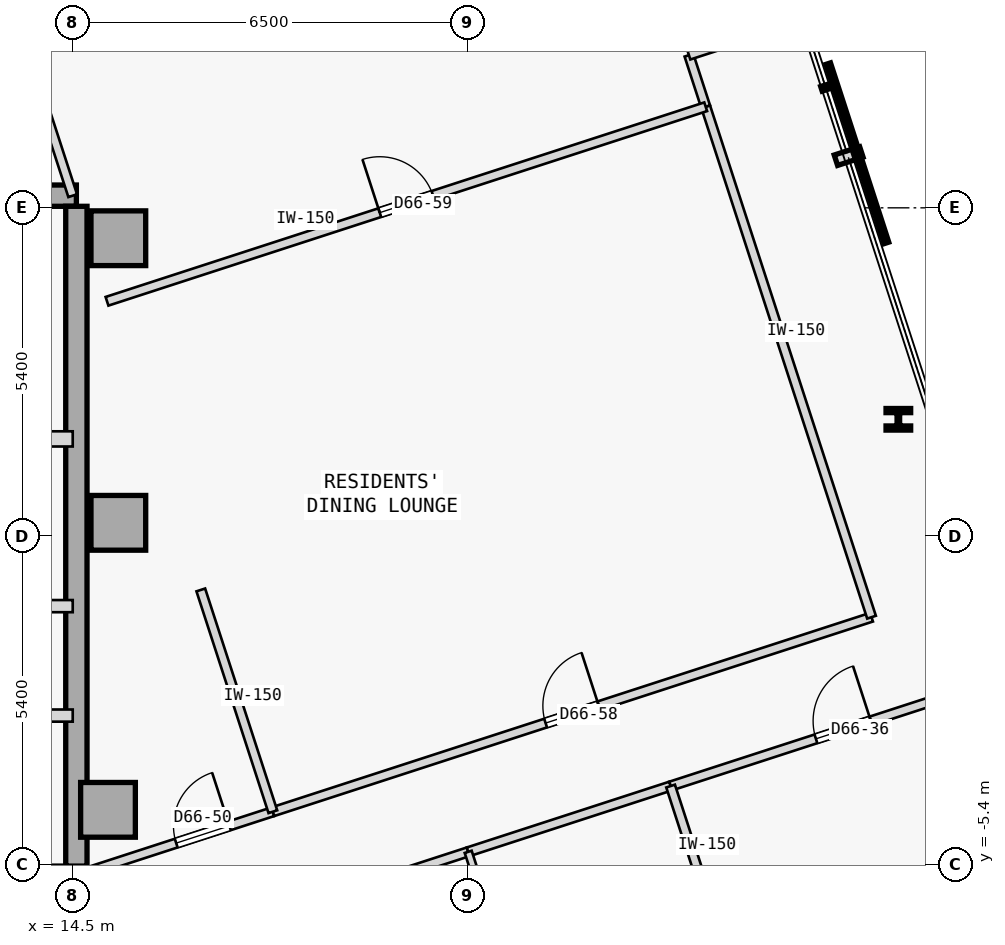
"""IFC4 building model, lengths in metres.
Left out: names, types, materials, properties, quantities, classifications, styles, units other than length and angle.
Written with IfcOpenShell. Run it as: python <this file> out.ifc"""

import sys

from ifc_helpers import new_model, si_unit, direction, frame, frame_2d, origin, origin_2d, place, context, subcontext, project, spatial, rectangle, i_section, extrude, element, fill, save


model = new_model("IFC4")
c1 = context("Model", 3, precision=1e-05, world=origin(), true_north=direction((0.0, 1.0)))
c2 = subcontext(c1, "Body", "Model", "MODEL_VIEW")
j1 = project(units=[si_unit("LENGTHUNIT", "METRE"), si_unit("PLANEANGLEUNIT", "RADIAN")], contexts=[c1])
p1 = place(None, origin())
s1 = spatial("IfcSite", under=j1, at=p1, CompositionType="ELEMENT")
p2 = place(p1, origin())
s2 = spatial("IfcBuilding", under=s1, at=p2, CompositionType="ELEMENT")
p3 = place(p2, frame((0.0, 0.0, 247.75)))
s3 = spatial("IfcBuildingStorey", under=s2, at=p3, CompositionType="ELEMENT", Elevation=247.75)
for number, where, z_axis, x_axis in (
    (1, (15.25, 4.9, 0.0), (0.0, 0.0, 1.0), (1.0, 0.0, 0.0)),
    (2, (15.25, 0.22, 0.0), (0.0, 0.0, 1.0), (1.0, 0.0, 0.0)),
    (3, (15.08, -4.5, 0.0), (0.0, 0.0, 1.0), (1.0, 0.0, 0.0)),
):
    element("IfcColumn", number, at=place(p3, frame(where, z_axis=z_axis, x_axis=x_axis)), inside=s3, PredefinedType="COLUMN", context=c2, shape_type="SweptSolid", body=[
        extrude(rectangle(XDim=0.9, YDim=0.9, at=origin_2d()), origin(), (0.0, 0.0, 1.0), 3.35),
    ])
p4 = place(p3, frame((3.15, 5.6, 0.0), z_axis=(0.0, 0.0, 1.0), x_axis=(1.0, 0.0, 0.0)))
e4 = element("IfcWall", 4, at=p4, inside=s3, PredefinedType="SHEAR", context=c2, shape_type="SweptSolid", body=[
    extrude(rectangle(XDim=11.41, YDim=0.35, at=frame_2d((5.705, 0.0))), origin(), (0.0, 0.0, 1.0), 3.125),
])
p5 = place(p3, frame((14.56, -5.425, 0.0), z_axis=(0.0, 0.0, 1.0), x_axis=(0.0, 1.0, 0.0)))
e5 = element("IfcWall", 5, at=p5, inside=s3, PredefinedType="SHEAR", context=c2, shape_type="SweptSolid", body=[
    extrude(rectangle(XDim=10.85, YDim=0.35, at=frame_2d((5.425, 0.0))), origin(), (0.0, 0.0, 1.0), 3.125),
])
p6 = place(p3, frame((28.078, 1.922, 0.0), z_axis=(0.0, 0.0, 1.0), x_axis=(1.0, 0.0, 0.0)))
e6 = element("IfcColumn", 6, at=p6, inside=s3, PredefinedType="COLUMN", context=c2, shape_type="SweptSolid", body=[
    extrude(i_section(OverallWidth=0.405, OverallDepth=0.355, WebThickness=0.042, FlangeThickness=0.068, FilletRadius=0.015, at=origin_2d()), origin(), (0.0, 0.0, 1.0), 3.35),
])
p7 = place(p3, frame((10.9, 1.6, 0.0), z_axis=(0.0, 0.0, 1.0), x_axis=(1.0, 0.0, 0.0)))
e7 = element("IfcWall", 7, at=p7, inside=s3, PredefinedType="STANDARD", context=c2, shape_type="SweptSolid", body=[
    extrude(rectangle(XDim=3.6, YDim=0.25, at=frame_2d((1.8, 0.0))), origin(), (0.0, 0.0, 1.0), 3.125),
])
p8 = place(p7, frame((1.62, 0.0, 0.0)))
e8 = element("IfcOpeningElement", 8, at=p8, cuts=e7, PredefinedType="OPENING", context=c2, shape_type="SweptSolid", body=[
    extrude(rectangle(XDim=1.05, YDim=2.15, at=frame_2d((0.525, 1.075))), frame((0.0, 0.135, 0.0), z_axis=(0.0, -1.0, 0.0), x_axis=(1.0, 0.0, 0.0)), (0.0, 0.0, 1.0), 0.27),
])
p9 = place(p3, frame((11.55, -1.15, 0.0), z_axis=(0.0, 0.0, 1.0), x_axis=(1.0, 0.0, 0.0)))
e9 = element("IfcWall", 9, at=p9, inside=s3, PredefinedType="STANDARD", context=c2, shape_type="SweptSolid", body=[
    extrude(rectangle(XDim=2.95, YDim=0.2, at=frame_2d((1.475, 0.0))), origin(), (0.0, 0.0, 1.0), 3.125),
])
p10 = place(p9, frame((0.75, 0.0, 0.0)))
e10 = element("IfcOpeningElement", 10, at=p10, cuts=e9, PredefinedType="OPENING", context=c2, shape_type="SweptSolid", body=[
    extrude(rectangle(XDim=1.05, YDim=2.18, at=frame_2d((0.525, 1.09))), frame((0.0, 0.11, 0.0), z_axis=(0.0, -1.0, 0.0), x_axis=(1.0, 0.0, 0.0)), (0.0, 0.0, 1.0), 0.22),
])
p11 = place(p3, frame((3.7, -2.95, 0.0), z_axis=(0.0, 0.0, 1.0), x_axis=(1.0, 0.0, 0.0)))
e11 = element("IfcWall", 11, at=p11, inside=s3, PredefinedType="STANDARD", context=c2, shape_type="SweptSolid", body=[
    extrude(rectangle(XDim=10.8, YDim=0.2, at=frame_2d((5.4, 0.0))), origin(), (0.0, 0.0, 1.0), 3.125),
])
p12 = place(p11, frame((0.53, 0.0, 0.0)))
e12 = element("IfcOpeningElement", 12, at=p12, cuts=e11, PredefinedType="OPENING", context=c2, shape_type="SweptSolid", body=[
    extrude(rectangle(XDim=1.1, YDim=2.15, at=frame_2d((0.55, 1.075))), frame((0.0, 0.11, 0.0), z_axis=(0.0, -1.0, 0.0), x_axis=(1.0, 0.0, 0.0)), (0.0, 0.0, 1.0), 0.22),
])
p13 = place(p11, frame((6.02, 0.0, 0.0)))
e13 = element("IfcOpeningElement", 13, at=p13, cuts=e11, PredefinedType="OPENING", context=c2, shape_type="SweptSolid", body=[
    extrude(rectangle(XDim=0.92, YDim=2.15, at=frame_2d((0.46, 1.075))), frame((0.0, 0.11, 0.0), z_axis=(0.0, -1.0, 0.0), x_axis=(1.0, 0.0, 0.0)), (0.0, 0.0, 1.0), 0.22),
])
p14 = place(p3, frame((24.332, -4.109, 0.0), z_axis=(0.0, 0.0, 1.0), x_axis=(0.951058083458, 0.309012171103, 0.0)))
e14 = element("IfcWall", 14, at=p14, inside=s3, PredefinedType="PARTITIONING", context=c2, shape_type="SweptSolid", body=[
    extrude(rectangle(XDim=5.976, YDim=0.15, at=frame_2d((2.988, 0.0))), origin(), (0.0, 0.0, 1.0), 3.125),
])
p15 = place(p14, frame((2.513, 0.0, 0.0)))
e15 = element("IfcOpeningElement", 15, at=p15, cuts=e14, PredefinedType="OPENING", context=c2, shape_type="SweptSolid", body=[
    extrude(rectangle(XDim=0.95, YDim=2.15, at=frame_2d((0.475, 1.075))), frame((0.0, 0.085, 0.0), z_axis=(0.0, -1.0, 0.0), x_axis=(1.0, 0.0, 0.0)), (0.0, 0.0, 1.0), 0.17),
])
p16 = place(p3, frame((16.866, -6.535, 0.0), z_axis=(0.0, 0.0, 1.0), x_axis=(0.951041492154, 0.309063230101, 0.0)))
e16 = element("IfcWall", 16, at=p16, inside=s3, PredefinedType="PARTITIONING", context=c2, shape_type="SweptSolid", body=[
    extrude(rectangle(XDim=4.35, YDim=0.15, at=frame_2d((2.175, 0.0))), origin(), (0.0, 0.0, 1.0), 3.125),
])
p17 = place(p3, frame((21.003, -5.19, 0.0), z_axis=(0.0, 0.0, 1.0), x_axis=(0.951055596592, 0.309019824916, 0.0)))
e17 = element("IfcWall", 17, at=p17, inside=s3, PredefinedType="PARTITIONING", context=c2, shape_type="SweptSolid", body=[
    extrude(rectangle(XDim=3.5, YDim=0.15, at=frame_2d((1.75, 0.0))), origin(), (0.0, 0.0, 1.0), 3.125),
])
p18 = place(p3, frame((14.5, -5.6, 0.0), z_axis=(0.0, 0.0, 1.0), x_axis=(0.951047546178, 0.309044600193, 0.0)))
e18 = element("IfcWall", 18, at=p18, inside=s3, PredefinedType="PARTITIONING", context=c2, shape_type="SweptSolid", body=[
    extrude(rectangle(XDim=3.461, YDim=0.15, at=frame_2d((1.73, 0.0))), origin(), (0.0, 0.0, 1.0), 3.125),
])
p19 = place(p18, frame((1.79, 0.0, 0.0)))
e19 = element("IfcOpeningElement", 19, at=p19, cuts=e18, PredefinedType="OPENING", context=c2, shape_type="SweptSolid", body=[
    extrude(rectangle(XDim=0.92, YDim=2.15, at=frame_2d((0.46, 1.075))), frame((0.0, 0.085, 0.0), z_axis=(0.0, -1.0, 0.0), x_axis=(1.0, 0.0, 0.0)), (0.0, 0.0, 1.0), 0.17),
])
p20 = place(p3, frame((17.791, -4.531, 0.0), z_axis=(0.0, 0.0, 1.0), x_axis=(0.951056769902, 0.309016213852, 0.0)))
e20 = element("IfcWall", 20, at=p20, inside=s3, PredefinedType="PARTITIONING", context=c2, shape_type="SweptSolid", body=[
    extrude(rectangle(XDim=10.352, YDim=0.15, at=frame_2d((5.176, 0.0))), origin(), (0.0, 0.0, 1.0), 3.125),
])
p21 = place(p20, frame((4.716, 0.0, 0.0)))
e21 = element("IfcOpeningElement", 21, at=p21, cuts=e20, PredefinedType="OPENING", context=c2, shape_type="SweptSolid", body=[
    extrude(rectangle(XDim=0.92, YDim=2.15, at=frame_2d((0.46, 1.075))), frame((0.0, 0.085, 0.0), z_axis=(0.0, -1.0, 0.0), x_axis=(1.0, 0.0, 0.0)), (0.0, 0.0, 1.0), 0.17),
])
p22 = place(p3, frame((27.637, -1.332, 0.0), z_axis=(0.0, 0.0, 1.0), x_axis=(-0.309040411618, 0.951048907253, 0.0)))
e22 = element("IfcWall", 22, at=p22, inside=s3, PredefinedType="PARTITIONING", context=c2, shape_type="SweptSolid", body=[
    extrude(rectangle(XDim=8.826, YDim=0.15, at=frame_2d((4.413, 0.0))), origin(), (0.0, 0.0, 1.0), 3.125),
])
p23 = place(p3, frame((24.909, 7.062, 0.0), z_axis=(0.0, 0.0, 1.0), x_axis=(-0.30899324298, 0.951064233263, 0.0)))
e23 = element("IfcWall", 23, at=p23, inside=s3, PredefinedType="PARTITIONING", context=c2, shape_type="SweptSolid", body=[
    extrude(rectangle(XDim=0.892, YDim=0.15, at=frame_2d((0.446, 0.0))), origin(), (0.0, 0.0, 1.0), 3.125),
])
p24 = place(p3, frame((24.634, 7.91, 0.0), z_axis=(0.0, 0.0, 1.0), x_axis=(0.951054051148, 0.309024581215, 0.0)))
e24 = element("IfcWall", 24, at=p24, inside=s3, PredefinedType="PARTITIONING", context=c2, shape_type="SweptSolid", body=[
    extrude(rectangle(XDim=1.975, YDim=0.15, at=frame_2d((0.988, 0.0))), origin(), (0.0, 0.0, 1.0), 3.125),
])
p25 = place(p3, frame((25.012, -6.201, 0.0), z_axis=(0.0, 0.0, 1.0), x_axis=(-0.309028364152, 0.951052821956, 0.0)))
e25 = element("IfcWall", 25, at=p25, inside=s3, PredefinedType="PARTITIONING", context=c2, shape_type="SweptSolid", body=[
    extrude(rectangle(XDim=2.2, YDim=0.15, at=frame_2d((1.1, 0.0))), origin(), (0.0, 0.0, 1.0), 3.125),
])
p26 = place(p3, frame((21.683, -7.283, 0.0), z_axis=(0.0, 0.0, 1.0), x_axis=(-0.30892799396, 0.951085429679, 0.0)))
e26 = element("IfcWall", 26, at=p26, inside=s3, PredefinedType="PARTITIONING", context=c2, shape_type="SweptSolid", body=[
    extrude(rectangle(XDim=2.2, YDim=0.12, at=frame_2d((1.1, 0.0))), origin(), (0.0, 0.0, 1.0), 3.125),
])
p27 = place(p3, frame((17.791, -4.531, 0.0), z_axis=(0.0, 0.0, 1.0), x_axis=(-0.309018414265, 0.951056054944, 0.0)))
e27 = element("IfcWall", 27, at=p27, inside=s3, PredefinedType="PARTITIONING", context=c2, shape_type="SweptSolid", body=[
    extrude(rectangle(XDim=3.835, YDim=0.15, at=frame_2d((1.917, 0.0))), origin(), (0.0, 0.0, 1.0), 3.125),
])
p28 = place(p3, frame((14.5, 5.6, 0.0), z_axis=(0.0, 0.0, 1.0), x_axis=(-0.308974360462, 0.951070367837, 0.0)))
e28 = element("IfcWall", 28, at=p28, inside=s3, PredefinedType="PARTITIONING", context=c2, shape_type="SweptSolid", body=[
    extrude(rectangle(XDim=4.843, YDim=0.15, at=frame_2d((2.421, 0.0))), origin(), (0.0, 0.0, 1.0), 3.125),
])
p29 = place(p3, frame((15.064, 3.863, 0.0), z_axis=(0.0, 0.0, 1.0), x_axis=(0.951061448945, 0.309001812827, 0.0)))
e29 = element("IfcWall", 29, at=p29, inside=s3, PredefinedType="PARTITIONING", context=c2, shape_type="SweptSolid", body=[
    extrude(rectangle(XDim=10.352, YDim=0.15, at=frame_2d((5.176, 0.0))), origin(), (0.0, 0.0, 1.0), 3.125),
])
p30 = place(p29, frame((4.716, 0.0, 0.0)))
e30 = element("IfcOpeningElement", 30, at=p30, cuts=e29, PredefinedType="OPENING", context=c2, shape_type="SweptSolid", body=[
    extrude(rectangle(XDim=0.92, YDim=2.15, at=frame_2d((0.46, 1.075))), frame((0.0, 0.085, 0.0), z_axis=(0.0, -1.0, 0.0), x_axis=(1.0, 0.0, 0.0)), (0.0, 0.0, 1.0), 0.17),
])
p31 = place(p15, origin())
e31 = element("IfcDoor", 31, at=p31, inside=s3, OperationType="SINGLE_SWING_RIGHT", PredefinedType="DOOR", context=c2, shape_type="SweptSolid", body=[
    extrude(rectangle(XDim=0.95, YDim=2.15, at=frame_2d((0.475, 1.075))), frame((0.0, 0.025, 0.0), z_axis=(0.0, -1.0, 0.0), x_axis=(1.0, 0.0, 0.0)), (0.0, 0.0, 1.0), 0.05),
])
fill(e15, e31)
p32 = place(p19, origin())
e32 = element("IfcDoor", 32, at=p32, inside=s3, OperationType="SINGLE_SWING_RIGHT", PredefinedType="DOOR", context=c2, shape_type="SweptSolid", body=[
    extrude(rectangle(XDim=0.92, YDim=2.15, at=frame_2d((0.46, 1.075))), frame((0.0, 0.025, 0.0), z_axis=(0.0, -1.0, 0.0), x_axis=(1.0, 0.0, 0.0)), (0.0, 0.0, 1.0), 0.05),
])
fill(e19, e32)
p33 = place(p21, origin())
e33 = element("IfcDoor", 33, at=p33, inside=s3, OperationType="SINGLE_SWING_RIGHT", PredefinedType="DOOR", context=c2, shape_type="SweptSolid", body=[
    extrude(rectangle(XDim=0.92, YDim=2.15, at=frame_2d((0.46, 1.075))), frame((0.0, 0.025, 0.0), z_axis=(0.0, -1.0, 0.0), x_axis=(1.0, 0.0, 0.0)), (0.0, 0.0, 1.0), 0.05),
])
fill(e21, e33)
p34 = place(p30, origin())
e34 = element("IfcDoor", 34, at=p34, inside=s3, OperationType="SINGLE_SWING_LEFT", PredefinedType="DOOR", context=c2, shape_type="SweptSolid", body=[
    extrude(rectangle(XDim=0.92, YDim=2.15, at=frame_2d((0.46, 1.075))), frame((0.0, 0.025, 0.0), z_axis=(0.0, -1.0, 0.0), x_axis=(1.0, 0.0, 0.0)), (0.0, 0.0, 1.0), 0.05),
])
fill(e30, e34)
save(model, sys.argv[1])
